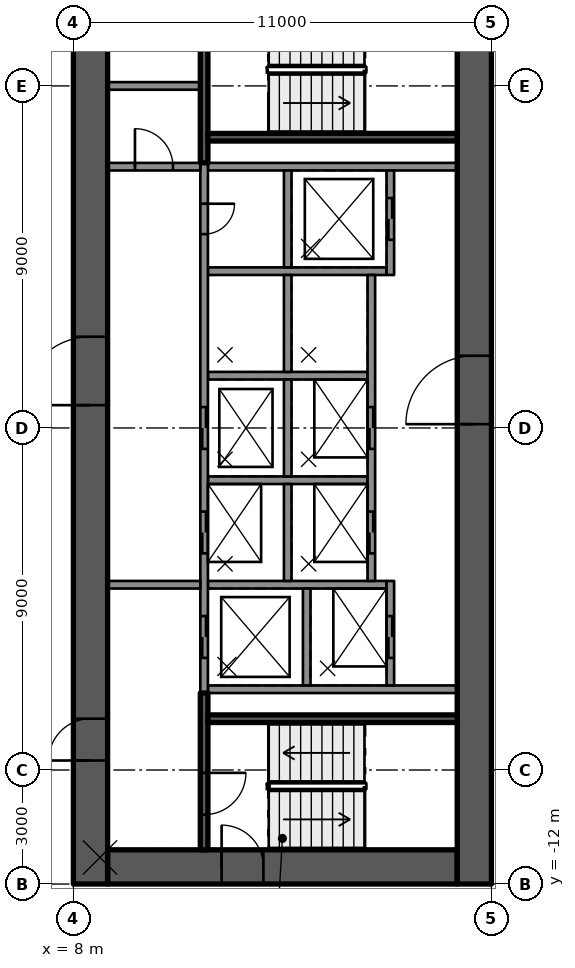
"""IFC4 building model, lengths in metres.
Left out: names, types, materials, properties, quantities, classifications, styles, units other than length and angle.
Written with IfcOpenShell. Run it as: python <this file> out.ifc"""

import sys

from ifc_helpers import new_model, si_unit, direction, frame, frame_2d, origin, place, context, subcontext, project, spatial, rectangle, extrude, element, fill, save


model = new_model("IFC4")
c1 = context("Model", 3, precision=1e-05, world=origin(), true_north=direction((0.0, 1.0)))
c2 = subcontext(c1, "Body", "Model", "MODEL_VIEW")
j1 = project(units=[si_unit("LENGTHUNIT", "METRE"), si_unit("PLANEANGLEUNIT", "RADIAN")], contexts=[c1])
p1 = place(None, origin())
s1 = spatial("IfcSite", under=j1, at=p1, CompositionType="ELEMENT")
p2 = place(p1, origin())
s2 = spatial("IfcBuilding", under=s1, at=p2, CompositionType="ELEMENT")
p3 = place(p2, frame((0.0, 0.0, 40.8)))
s3 = spatial("IfcBuildingStorey", under=s2, at=p3, CompositionType="ELEMENT", Elevation=40.8)
p4 = place(p3, frame((8.9, -11.55, 0.0), z_axis=(0.0, 0.0, 1.0), x_axis=(1.0, 0.0, 0.0)))
e1 = element("IfcWall", 1, at=p4, inside=s3, PredefinedType="SHEAR", context=c2, shape_type="SweptSolid", body=[
    extrude(rectangle(XDim=9.2, YDim=0.9, at=frame_2d((4.6, 0.0))), origin(), (0.0, 0.0, 1.0), 3.5),
])
p5 = place(p4, frame((3.0, 0.0, 0.0)))
e2 = element("IfcOpeningElement", 2, at=p5, cuts=e1, PredefinedType="OPENING", context=c2, shape_type="SweptSolid", body=[
    extrude(rectangle(XDim=1.1, YDim=2.1, at=frame_2d((0.55, 1.05))), frame((0.0, 0.46, 0.0), z_axis=(0.0, -1.0, 0.0), x_axis=(1.0, 0.0, 0.0)), (0.0, 0.0, 1.0), 0.92),
])
p6 = place(p3, frame((8.45, -12.0, 0.0), z_axis=(0.0, 0.0, 1.0), x_axis=(0.0, 1.0, 0.0)))
e3 = element("IfcWall", 3, at=p6, inside=s3, PredefinedType="SHEAR", context=c2, shape_type="SweptSolid", body=[
    extrude(rectangle(XDim=24.0, YDim=0.9, at=frame_2d((12.0, 0.0))), origin(), (0.0, 0.0, 1.0), 3.5),
])
p7 = place(p6, frame((12.6, 0.0, 0.0)))
e4 = element("IfcOpeningElement", 4, at=p7, cuts=e3, PredefinedType="OPENING", context=c2, shape_type="SweptSolid", body=[
    extrude(rectangle(XDim=1.8, YDim=2.1, at=frame_2d((0.9, 1.05))), frame((0.0, 0.46, 0.0), z_axis=(0.0, -1.0, 0.0), x_axis=(1.0, 0.0, 0.0)), (0.0, 0.0, 1.0), 0.92),
])
p8 = place(p6, frame((3.25, 0.0, 0.0)))
e5 = element("IfcOpeningElement", 5, at=p8, cuts=e3, PredefinedType="OPENING", context=c2, shape_type="SweptSolid", body=[
    extrude(rectangle(XDim=1.1, YDim=2.1, at=frame_2d((0.55, 1.05))), frame((0.0, 0.46, 0.0), z_axis=(0.0, -1.0, 0.0), x_axis=(1.0, 0.0, 0.0)), (0.0, 0.0, 1.0), 0.92),
])
p9 = place(p3, frame((18.55, -12.0, 0.0), z_axis=(0.0, 0.0, 1.0), x_axis=(0.0, 1.0, 0.0)))
e6 = element("IfcWall", 6, at=p9, inside=s3, PredefinedType="SHEAR", context=c2, shape_type="SweptSolid", body=[
    extrude(rectangle(XDim=24.0, YDim=0.9, at=frame_2d((12.0, 0.0))), origin(), (0.0, 0.0, 1.0), 3.5),
])
p10 = place(p9, frame((12.1, 0.0, 0.0)))
e7 = element("IfcOpeningElement", 7, at=p10, cuts=e6, PredefinedType="OPENING", context=c2, shape_type="SweptSolid", body=[
    extrude(rectangle(XDim=1.8, YDim=2.1, at=frame_2d((0.9, 1.05))), frame((0.0, 0.46, 0.0), z_axis=(0.0, -1.0, 0.0), x_axis=(1.0, 0.0, 0.0)), (0.0, 0.0, 1.0), 0.92),
])
for number, where, z_axis, x_axis in (
    (8, (11.54, -6.875, 0.0), (0.0, 0.0, 1.0), (1.0, 0.0, 0.0)),
    (9, (11.54, 6.875, 0.0), (0.0, 0.0, 1.0), (1.0, 0.0, 0.0)),
):
    element("IfcWall", number, at=place(p3, frame(where, z_axis=z_axis, x_axis=x_axis)), inside=s3, PredefinedType="SOLIDWALL", context=c2, shape_type="SweptSolid", body=[
        extrude(rectangle(XDim=6.56, YDim=0.2, at=frame_2d((3.28, 0.0))), origin(), (0.0, 0.0, 1.0), 3.08),
    ])
p11 = place(p3, frame((11.54, 4.125, 0.0), z_axis=(0.0, 0.0, 1.0), x_axis=(1.0, 0.0, 0.0)))
e10 = element("IfcWall", 10, at=p11, inside=s3, PredefinedType="SOLIDWALL", context=c2, shape_type="SweptSolid", body=[
    extrude(rectangle(XDim=4.7, YDim=0.2, at=frame_2d((2.35, 0.0))), origin(), (0.0, 0.0, 1.0), 3.08),
])
for number, where, z_axis, x_axis in (
    (11, (11.54, 1.375, 0.0), (0.0, 0.0, 1.0), (1.0, 0.0, 0.0)),
    (12, (11.54, -1.375, 0.0), (0.0, 0.0, 1.0), (1.0, 0.0, 0.0)),
):
    element("IfcWall", number, at=place(p3, frame(where, z_axis=z_axis, x_axis=x_axis)), inside=s3, PredefinedType="SOLIDWALL", context=c2, shape_type="SweptSolid", body=[
        extrude(rectangle(XDim=4.2, YDim=0.2, at=frame_2d((2.1, 0.0))), origin(), (0.0, 0.0, 1.0), 3.08),
    ])
p12 = place(p3, frame((11.54, -4.125, 0.0), z_axis=(0.0, 0.0, 1.0), x_axis=(1.0, 0.0, 0.0)))
e13 = element("IfcWall", 13, at=p12, inside=s3, PredefinedType="SOLIDWALL", context=c2, shape_type="SweptSolid", body=[
    extrude(rectangle(XDim=4.7, YDim=0.2, at=frame_2d((2.35, 0.0))), origin(), (0.0, 0.0, 1.0), 3.08),
])
p13 = place(p3, frame((11.44, 6.975, 0.0), z_axis=(0.0, 0.0, 1.0), x_axis=(0.0, -1.0, 0.0)))
e14 = element("IfcWall", 14, at=p13, inside=s3, PredefinedType="SOLIDWALL", context=c2, shape_type="SweptSolid", body=[
    extrude(rectangle(XDim=13.95, YDim=0.2, at=frame_2d((6.975, 0.0))), origin(), (0.0, 0.0, 1.0), 3.08),
])
p14 = place(p13, frame((6.425, 0.0, 0.0)))
e15 = element("IfcOpeningElement", 15, at=p14, cuts=e14, PredefinedType="OPENING", context=c2, shape_type="SweptSolid", body=[
    extrude(rectangle(XDim=1.1, YDim=2.1, at=frame_2d((0.55, 1.05))), frame((0.0, 0.11, 0.0), z_axis=(0.0, -1.0, 0.0), x_axis=(1.0, 0.0, 0.0)), (0.0, 0.0, 1.0), 0.22),
])
p15 = place(p13, frame((9.175, 0.0, 0.0)))
e16 = element("IfcOpeningElement", 16, at=p15, cuts=e14, PredefinedType="OPENING", context=c2, shape_type="SweptSolid", body=[
    extrude(rectangle(XDim=1.1, YDim=2.1, at=frame_2d((0.55, 1.05))), frame((0.0, 0.11, 0.0), z_axis=(0.0, -1.0, 0.0), x_axis=(1.0, 0.0, 0.0)), (0.0, 0.0, 1.0), 0.22),
])
p16 = place(p13, frame((11.925, 0.0, 0.0)))
e17 = element("IfcOpeningElement", 17, at=p16, cuts=e14, PredefinedType="OPENING", context=c2, shape_type="SweptSolid", body=[
    extrude(rectangle(XDim=1.1, YDim=2.1, at=frame_2d((0.55, 1.05))), frame((0.0, 0.11, 0.0), z_axis=(0.0, -1.0, 0.0), x_axis=(1.0, 0.0, 0.0)), (0.0, 0.0, 1.0), 0.22),
])
p17 = place(p13, frame((1.075, 0.0, 0.0)))
e18 = element("IfcOpeningElement", 18, at=p17, cuts=e14, PredefinedType="OPENING", context=c2, shape_type="SweptSolid", body=[
    extrude(rectangle(XDim=0.8, YDim=2.1, at=frame_2d((0.4, 1.05))), frame((0.0, 0.11, 0.0), z_axis=(0.0, -1.0, 0.0), x_axis=(1.0, 0.0, 0.0)), (0.0, 0.0, 1.0), 0.22),
])
for number, where, z_axis, x_axis in (
    (19, (13.64, 6.775, 0.0), (0.0, 0.0, 1.0), (0.0, -1.0, 0.0)),
    (20, (13.64, 4.025, 0.0), (0.0, 0.0, 1.0), (0.0, -1.0, 0.0)),
    (21, (13.64, 1.275, 0.0), (0.0, 0.0, 1.0), (0.0, -1.0, 0.0)),
    (22, (13.64, -1.475, 0.0), (0.0, 0.0, 1.0), (0.0, -1.0, 0.0)),
    (23, (14.14, -4.225, 0.0), (0.0, 0.0, 1.0), (0.0, -1.0, 0.0)),
):
    element("IfcWall", number, at=place(p3, frame(where, z_axis=z_axis, x_axis=x_axis)), inside=s3, PredefinedType="SOLIDWALL", context=c2, shape_type="SweptSolid", body=[
        extrude(rectangle(XDim=2.55, YDim=0.2, at=frame_2d((1.275, 0.0))), origin(), (0.0, 0.0, 1.0), 3.08),
    ])
p18 = place(p3, frame((16.34, 6.775, 0.0), z_axis=(0.0, 0.0, 1.0), x_axis=(0.0, -1.0, 0.0)))
e24 = element("IfcWall", 24, at=p18, inside=s3, PredefinedType="SOLIDWALL", context=c2, shape_type="SweptSolid", body=[
    extrude(rectangle(XDim=2.75, YDim=0.2, at=frame_2d((1.375, 0.0))), origin(), (0.0, 0.0, 1.0), 3.08),
])
p19 = place(p18, frame((0.725, 0.0, 0.0)))
e25 = element("IfcOpeningElement", 25, at=p19, cuts=e24, PredefinedType="OPENING", context=c2, shape_type="SweptSolid", body=[
    extrude(rectangle(XDim=1.1, YDim=2.1, at=frame_2d((0.55, 1.05))), frame((0.0, 0.11, 0.0), z_axis=(0.0, -1.0, 0.0), x_axis=(1.0, 0.0, 0.0)), (0.0, 0.0, 1.0), 0.22),
])
p20 = place(p3, frame((15.84, 4.025, 0.0), z_axis=(0.0, 0.0, 1.0), x_axis=(0.0, -1.0, 0.0)))
e26 = element("IfcWall", 26, at=p20, inside=s3, PredefinedType="SOLIDWALL", context=c2, shape_type="SweptSolid", body=[
    extrude(rectangle(XDim=8.05, YDim=0.2, at=frame_2d((4.025, 0.0))), origin(), (0.0, 0.0, 1.0), 3.08),
])
p21 = place(p20, frame((3.475, 0.0, 0.0)))
e27 = element("IfcOpeningElement", 27, at=p21, cuts=e26, PredefinedType="OPENING", context=c2, shape_type="SweptSolid", body=[
    extrude(rectangle(XDim=1.1, YDim=2.1, at=frame_2d((0.55, 1.05))), frame((0.0, 0.11, 0.0), z_axis=(0.0, -1.0, 0.0), x_axis=(1.0, 0.0, 0.0)), (0.0, 0.0, 1.0), 0.22),
])
p22 = place(p20, frame((6.225, 0.0, 0.0)))
e28 = element("IfcOpeningElement", 28, at=p22, cuts=e26, PredefinedType="OPENING", context=c2, shape_type="SweptSolid", body=[
    extrude(rectangle(XDim=1.1, YDim=2.1, at=frame_2d((0.55, 1.05))), frame((0.0, 0.11, 0.0), z_axis=(0.0, -1.0, 0.0), x_axis=(1.0, 0.0, 0.0)), (0.0, 0.0, 1.0), 0.22),
])
p23 = place(p3, frame((16.34, -4.025, 0.0), z_axis=(0.0, 0.0, 1.0), x_axis=(0.0, -1.0, 0.0)))
e29 = element("IfcWall", 29, at=p23, inside=s3, PredefinedType="SOLIDWALL", context=c2, shape_type="SweptSolid", body=[
    extrude(rectangle(XDim=2.75, YDim=0.2, at=frame_2d((1.375, 0.0))), origin(), (0.0, 0.0, 1.0), 3.08),
])
p24 = place(p23, frame((0.925, 0.0, 0.0)))
e30 = element("IfcOpeningElement", 30, at=p24, cuts=e29, PredefinedType="OPENING", context=c2, shape_type="SweptSolid", body=[
    extrude(rectangle(XDim=1.1, YDim=2.1, at=frame_2d((0.55, 1.05))), frame((0.0, 0.11, 0.0), z_axis=(0.0, -1.0, 0.0), x_axis=(1.0, 0.0, 0.0)), (0.0, 0.0, 1.0), 0.22),
])
p25 = place(p3, frame((11.44, -6.975, 0.0), z_axis=(0.0, 0.0, 1.0), x_axis=(0.0, -1.0, 0.0)))
e31 = element("IfcWall", 31, at=p25, inside=s3, PredefinedType="SOLIDWALL", context=c2, shape_type="SweptSolid", body=[
    extrude(rectangle(XDim=4.125, YDim=0.2, at=frame_2d((2.062, 0.0))), origin(), (0.0, 0.0, 1.0), 3.08),
])
p26 = place(p25, frame((2.1, 0.0, 0.0)))
e32 = element("IfcOpeningElement", 32, at=p26, cuts=e31, PredefinedType="OPENING", context=c2, shape_type="SweptSolid", body=[
    extrude(rectangle(XDim=1.1, YDim=2.1, at=frame_2d((0.55, 1.05))), frame((0.0, 0.11, 0.0), z_axis=(0.0, -1.0, 0.0), x_axis=(1.0, 0.0, 0.0)), (0.0, 0.0, 1.0), 0.22),
])
p27 = place(p3, frame((11.54, -7.65, 0.0), z_axis=(0.0, 0.0, 1.0), x_axis=(1.0, 0.0, 0.0)))
e33 = element("IfcWall", 33, at=p27, inside=s3, PredefinedType="SOLIDWALL", context=c2, shape_type="SweptSolid", body=[
    extrude(rectangle(XDim=6.56, YDim=0.2, at=frame_2d((3.28, 0.0))), origin(), (0.0, 0.0, 1.0), 3.08),
])
p28 = place(p3, frame((11.44, 11.1, 0.0), z_axis=(0.0, 0.0, 1.0), x_axis=(0.0, -1.0, 0.0)))
e34 = element("IfcWall", 34, at=p28, inside=s3, PredefinedType="SOLIDWALL", context=c2, shape_type="SweptSolid", body=[
    extrude(rectangle(XDim=4.125, YDim=0.2, at=frame_2d((2.062, 0.0))), origin(), (0.0, 0.0, 1.0), 3.08),
])
p29 = place(p3, frame((11.54, 7.65, 0.0), z_axis=(0.0, 0.0, 1.0), x_axis=(1.0, 0.0, 0.0)))
e35 = element("IfcWall", 35, at=p29, inside=s3, PredefinedType="SOLIDWALL", context=c2, shape_type="SweptSolid", body=[
    extrude(rectangle(XDim=6.56, YDim=0.2, at=frame_2d((3.28, 0.0))), origin(), (0.0, 0.0, 1.0), 3.08),
])
p30 = place(p3, frame((8.9, -4.125, 0.0), z_axis=(0.0, 0.0, 1.0), x_axis=(1.0, 0.0, 0.0)))
e36 = element("IfcWall", 36, at=p30, inside=s3, PredefinedType="PARTITIONING", context=c2, shape_type="SweptSolid", body=[
    extrude(rectangle(XDim=2.44, YDim=0.2, at=frame_2d((1.22, 0.0))), origin(), (0.0, 0.0, 1.0), 3.08),
])
p31 = place(p3, frame((8.9, 6.875, 0.0), z_axis=(0.0, 0.0, 1.0), x_axis=(1.0, 0.0, 0.0)))
e37 = element("IfcWall", 37, at=p31, inside=s3, PredefinedType="PARTITIONING", context=c2, shape_type="SweptSolid", body=[
    extrude(rectangle(XDim=2.44, YDim=0.2, at=frame_2d((1.22, 0.0))), origin(), (0.0, 0.0, 1.0), 3.08),
])
p32 = place(p31, frame((0.72, 0.0, 0.0)))
e38 = element("IfcOpeningElement", 38, at=p32, cuts=e37, PredefinedType="OPENING", context=c2, shape_type="SweptSolid", body=[
    extrude(rectangle(XDim=1.0, YDim=2.1, at=frame_2d((0.5, 1.05))), frame((0.0, 0.11, 0.0), z_axis=(0.0, -1.0, 0.0), x_axis=(1.0, 0.0, 0.0)), (0.0, 0.0, 1.0), 0.22),
])
p33 = place(p3, frame((8.9, 9.0, 0.0), z_axis=(0.0, 0.0, 1.0), x_axis=(1.0, 0.0, 0.0)))
e39 = element("IfcWall", 39, at=p33, inside=s3, PredefinedType="PARTITIONING", context=c2, shape_type="SweptSolid", body=[
    extrude(rectangle(XDim=2.44, YDim=0.2, at=frame_2d((1.22, 0.0))), origin(), (0.0, 0.0, 1.0), 3.08),
])
p34 = place(p19, origin())
e40 = element("IfcDoor", 40, at=p34, inside=s3, OperationType="DOUBLE_DOOR_SLIDING", PredefinedType="DOOR", context=c2, shape_type="SweptSolid", body=[
    extrude(rectangle(XDim=1.1, YDim=2.1, at=frame_2d((0.55, 1.05))), frame((0.0, 0.025, 0.0), z_axis=(0.0, -1.0, 0.0), x_axis=(1.0, 0.0, 0.0)), (0.0, 0.0, 1.0), 0.05),
])
fill(e25, e40)
p35 = place(p14, origin())
e41 = element("IfcDoor", 41, at=p35, inside=s3, OperationType="DOUBLE_DOOR_SLIDING", PredefinedType="DOOR", context=c2, shape_type="SweptSolid", body=[
    extrude(rectangle(XDim=1.1, YDim=2.1, at=frame_2d((0.55, 1.05))), frame((0.0, 0.025, 0.0), z_axis=(0.0, -1.0, 0.0), x_axis=(1.0, 0.0, 0.0)), (0.0, 0.0, 1.0), 0.05),
])
fill(e15, e41)
p36 = place(p21, origin())
e42 = element("IfcDoor", 42, at=p36, inside=s3, OperationType="DOUBLE_DOOR_SLIDING", PredefinedType="DOOR", context=c2, shape_type="SweptSolid", body=[
    extrude(rectangle(XDim=1.1, YDim=2.1, at=frame_2d((0.55, 1.05))), frame((0.0, 0.025, 0.0), z_axis=(0.0, -1.0, 0.0), x_axis=(1.0, 0.0, 0.0)), (0.0, 0.0, 1.0), 0.05),
])
fill(e27, e42)
p37 = place(p15, origin())
e43 = element("IfcDoor", 43, at=p37, inside=s3, OperationType="DOUBLE_DOOR_SLIDING", PredefinedType="DOOR", context=c2, shape_type="SweptSolid", body=[
    extrude(rectangle(XDim=1.1, YDim=2.1, at=frame_2d((0.55, 1.05))), frame((0.0, 0.025, 0.0), z_axis=(0.0, -1.0, 0.0), x_axis=(1.0, 0.0, 0.0)), (0.0, 0.0, 1.0), 0.05),
])
fill(e16, e43)
p38 = place(p22, origin())
e44 = element("IfcDoor", 44, at=p38, inside=s3, OperationType="DOUBLE_DOOR_SLIDING", PredefinedType="DOOR", context=c2, shape_type="SweptSolid", body=[
    extrude(rectangle(XDim=1.1, YDim=2.1, at=frame_2d((0.55, 1.05))), frame((0.0, 0.025, 0.0), z_axis=(0.0, -1.0, 0.0), x_axis=(1.0, 0.0, 0.0)), (0.0, 0.0, 1.0), 0.05),
])
fill(e28, e44)
p39 = place(p16, origin())
e45 = element("IfcDoor", 45, at=p39, inside=s3, OperationType="DOUBLE_DOOR_SLIDING", PredefinedType="DOOR", context=c2, shape_type="SweptSolid", body=[
    extrude(rectangle(XDim=1.1, YDim=2.1, at=frame_2d((0.55, 1.05))), frame((0.0, 0.025, 0.0), z_axis=(0.0, -1.0, 0.0), x_axis=(1.0, 0.0, 0.0)), (0.0, 0.0, 1.0), 0.05),
])
fill(e17, e45)
p40 = place(p24, origin())
e46 = element("IfcDoor", 46, at=p40, inside=s3, OperationType="DOUBLE_DOOR_SLIDING", PredefinedType="DOOR", context=c2, shape_type="SweptSolid", body=[
    extrude(rectangle(XDim=1.1, YDim=2.1, at=frame_2d((0.55, 1.05))), frame((0.0, 0.025, 0.0), z_axis=(0.0, -1.0, 0.0), x_axis=(1.0, 0.0, 0.0)), (0.0, 0.0, 1.0), 0.05),
])
fill(e30, e46)
p41 = place(p17, origin())
e47 = element("IfcDoor", 47, at=p41, inside=s3, OperationType="SINGLE_SWING_LEFT", PredefinedType="DOOR", context=c2, shape_type="SweptSolid", body=[
    extrude(rectangle(XDim=0.8, YDim=2.1, at=frame_2d((0.4, 1.05))), frame((0.0, 0.025, 0.0), z_axis=(0.0, -1.0, 0.0), x_axis=(1.0, 0.0, 0.0)), (0.0, 0.0, 1.0), 0.05),
])
fill(e18, e47)
p42 = place(p7, origin())
e48 = element("IfcDoor", 48, at=p42, inside=s3, OperationType="SINGLE_SWING_RIGHT", PredefinedType="DOOR", context=c2, shape_type="SweptSolid", body=[
    extrude(rectangle(XDim=1.8, YDim=2.1, at=frame_2d((0.9, 1.05))), frame((0.0, 0.025, 0.0), z_axis=(0.0, -1.0, 0.0), x_axis=(1.0, 0.0, 0.0)), (0.0, 0.0, 1.0), 0.05),
])
fill(e4, e48)
p43 = place(p10, origin())
e49 = element("IfcDoor", 49, at=p43, inside=s3, OperationType="SINGLE_SWING_RIGHT", PredefinedType="DOOR", context=c2, shape_type="SweptSolid", body=[
    extrude(rectangle(XDim=1.8, YDim=2.1, at=frame_2d((0.9, 1.05))), frame((0.0, 0.025, 0.0), z_axis=(0.0, -1.0, 0.0), x_axis=(1.0, 0.0, 0.0)), (0.0, 0.0, 1.0), 0.05),
])
fill(e7, e49)
p44 = place(p8, origin())
e50 = element("IfcDoor", 50, at=p44, inside=s3, OperationType="SINGLE_SWING_LEFT", PredefinedType="DOOR", context=c2, shape_type="SweptSolid", body=[
    extrude(rectangle(XDim=1.1, YDim=2.1, at=frame_2d((0.55, 1.05))), frame((0.0, 0.025, 0.0), z_axis=(0.0, -1.0, 0.0), x_axis=(1.0, 0.0, 0.0)), (0.0, 0.0, 1.0), 0.05),
])
fill(e5, e50)
p45 = place(p5, origin())
e51 = element("IfcDoor", 51, at=p45, inside=s3, OperationType="SINGLE_SWING_LEFT", PredefinedType="DOOR", context=c2, shape_type="SweptSolid", body=[
    extrude(rectangle(XDim=1.1, YDim=2.1, at=frame_2d((0.55, 1.05))), frame((0.0, 0.025, 0.0), z_axis=(0.0, -1.0, 0.0), x_axis=(1.0, 0.0, 0.0)), (0.0, 0.0, 1.0), 0.05),
])
fill(e2, e51)
p46 = place(p26, origin())
e52 = element("IfcDoor", 52, at=p46, inside=s3, OperationType="SINGLE_SWING_RIGHT", PredefinedType="DOOR", context=c2, shape_type="SweptSolid", body=[
    extrude(rectangle(XDim=1.1, YDim=2.1, at=frame_2d((0.55, 1.05))), frame((0.0, 0.025, 0.0), z_axis=(0.0, -1.0, 0.0), x_axis=(1.0, 0.0, 0.0)), (0.0, 0.0, 1.0), 0.05),
])
fill(e32, e52)
p47 = place(p32, origin())
e53 = element("IfcDoor", 53, at=p47, inside=s3, OperationType="SINGLE_SWING_RIGHT", PredefinedType="DOOR", context=c2, shape_type="SweptSolid", body=[
    extrude(rectangle(XDim=1.0, YDim=2.1, at=frame_2d((0.5, 1.05))), frame((0.0, 0.025, 0.0), z_axis=(0.0, -1.0, 0.0), x_axis=(1.0, 0.0, 0.0)), (0.0, 0.0, 1.0), 0.05),
])
fill(e38, e53)
save(model, sys.argv[1])
